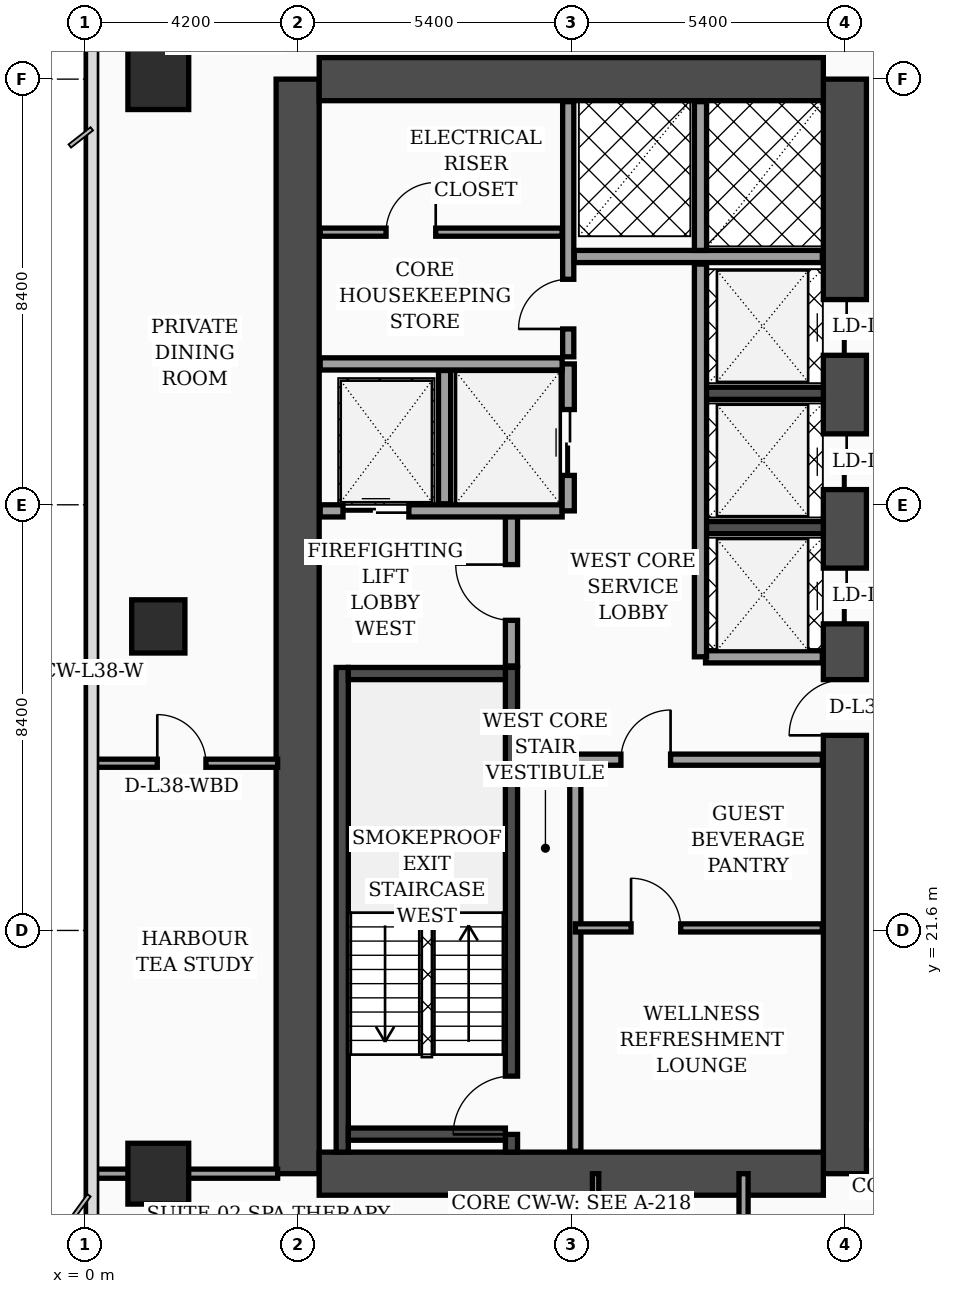
"""IFC4 building model, lengths in metres.
Left out: names, types, materials, properties, quantities, classifications, styles, units other than length and angle.
Written with IfcOpenShell. Run it as: python <this file> out.ifc"""

import sys

from ifc_helpers import new_model, si_unit, direction, frame, frame_2d, origin, origin_2d, place, context, subcontext, project, spatial, rectangle, extrude, element, fill, save


model = new_model("IFC4")
c1 = context("Model", 3, precision=1e-05, world=origin(), true_north=direction((0.0, 1.0)))
c2 = subcontext(c1, "Body", "Model", "MODEL_VIEW")
j1 = project(units=[si_unit("LENGTHUNIT", "METRE"), si_unit("PLANEANGLEUNIT", "RADIAN")], contexts=[c1])
p1 = place(None, origin())
s1 = spatial("IfcSite", under=j1, at=p1, CompositionType="ELEMENT")
p2 = place(p1, origin())
s2 = spatial("IfcBuilding", under=s1, at=p2, CompositionType="ELEMENT")
p3 = place(p2, frame((0.0, 0.0, 156.1)))
s3 = spatial("IfcBuildingStorey", under=s2, at=p3, CompositionType="ELEMENT", Elevation=156.1)
p4 = place(p3, frame((4.2, 16.8, 0.0), z_axis=(0.0, 0.0, 1.0), x_axis=(0.0, 1.0, 0.0)))
e1 = element("IfcWall", 1, at=p4, inside=s3, PredefinedType="SHEAR", context=c2, shape_type="SweptSolid", body=[
    extrude(rectangle(XDim=21.6, YDim=0.85, at=frame_2d((10.8, 0.0))), origin(), (0.0, 0.0, 1.0), 3.56),
])
p5 = place(p3, frame((15.0, 16.8, 0.0), z_axis=(0.0, 0.0, 1.0), x_axis=(0.0, 1.0, 0.0)))
e2 = element("IfcWall", 2, at=p5, inside=s3, PredefinedType="SHEAR", context=c2, shape_type="SweptSolid", body=[
    extrude(rectangle(XDim=21.6, YDim=0.85, at=frame_2d((10.8, 0.0))), origin(), (0.0, 0.0, 1.0), 3.56),
])
p6 = place(p5, frame((8.65, 0.0, 0.0)))
e3 = element("IfcOpeningElement", 3, at=p6, cuts=e2, PredefinedType="OPENING", context=c2, shape_type="SweptSolid", body=[
    extrude(rectangle(XDim=1.1, YDim=2.2, at=frame_2d((0.55, 1.1))), frame((0.0, 0.435, 0.0), z_axis=(0.0, -1.0, 0.0), x_axis=(1.0, 0.0, 0.0)), (0.0, 0.0, 1.0), 0.87),
])
p7 = place(p5, frame((10.85, 0.0, 0.0)))
e4 = element("IfcOpeningElement", 4, at=p7, cuts=e2, PredefinedType="OPENING", context=c2, shape_type="SweptSolid", body=[
    extrude(rectangle(XDim=1.1, YDim=2.2, at=frame_2d((0.55, 1.1))), frame((0.0, 0.435, 0.0), z_axis=(0.0, -1.0, 0.0), x_axis=(1.0, 0.0, 0.0)), (0.0, 0.0, 1.0), 0.87),
])
p8 = place(p5, frame((13.5, 0.0, 0.0)))
e5 = element("IfcOpeningElement", 5, at=p8, cuts=e2, PredefinedType="OPENING", context=c2, shape_type="SweptSolid", body=[
    extrude(rectangle(XDim=1.1, YDim=2.2, at=frame_2d((0.55, 1.1))), frame((0.0, 0.435, 0.0), z_axis=(0.0, -1.0, 0.0), x_axis=(1.0, 0.0, 0.0)), (0.0, 0.0, 1.0), 0.87),
])
p9 = place(p5, frame((16.15, 0.0, 0.0)))
e6 = element("IfcOpeningElement", 6, at=p9, cuts=e2, PredefinedType="OPENING", context=c2, shape_type="SweptSolid", body=[
    extrude(rectangle(XDim=1.1, YDim=2.2, at=frame_2d((0.55, 1.1))), frame((0.0, 0.435, 0.0), z_axis=(0.0, -1.0, 0.0), x_axis=(1.0, 0.0, 0.0)), (0.0, 0.0, 1.0), 0.87),
])
for number, where, z_axis, x_axis in (
    (7, (4.625, 38.4, 0.0), (0.0, 0.0, 1.0), (1.0, 0.0, 0.0)),
    (8, (4.625, 16.8, 0.0), (0.0, 0.0, 1.0), (1.0, 0.0, 0.0)),
):
    element("IfcWall", number, at=place(p3, frame(where, z_axis=z_axis, x_axis=x_axis)), inside=s3, PredefinedType="SHEAR", context=c2, shape_type="SweptSolid", body=[
        extrude(rectangle(XDim=9.95, YDim=0.85, at=frame_2d((4.975, 0.0))), origin(), (0.0, 0.0, 1.0), 3.56),
    ])
p10 = place(p3, frame((5.08, 17.225, 0.0), z_axis=(0.0, 0.0, 1.0), x_axis=(0.0, 1.0, 0.0)))
e9 = element("IfcWall", 9, at=p10, inside=s3, PredefinedType="SOLIDWALL", context=c2, shape_type="SweptSolid", body=[
    extrude(rectangle(XDim=9.565, YDim=0.24, at=frame_2d((4.782, 0.0))), origin(), (0.0, 0.0, 1.0), 3.56),
])
p11 = place(p3, frame((8.42, 17.225, 0.0), z_axis=(0.0, 0.0, 1.0), x_axis=(0.0, 1.0, 0.0)))
e10 = element("IfcWall", 10, at=p11, inside=s3, PredefinedType="SOLIDWALL", context=c2, shape_type="SweptSolid", body=[
    extrude(rectangle(XDim=9.565, YDim=0.24, at=frame_2d((4.782, 0.0))), origin(), (0.0, 0.0, 1.0), 3.56),
])
p12 = place(p11, frame((0.35, 0.0, 0.0)))
e11 = element("IfcOpeningElement", 11, at=p12, cuts=e10, PredefinedType="OPENING", context=c2, shape_type="SweptSolid", body=[
    extrude(rectangle(XDim=1.15, YDim=2.2, at=frame_2d((0.575, 1.1))), frame((0.0, 0.13, 0.0), z_axis=(0.0, -1.0, 0.0), x_axis=(1.0, 0.0, 0.0)), (0.0, 0.0, 1.0), 0.26),
])
for number, where, z_axis, x_axis in (
    (12, (5.2, 17.58, 0.0), (0.0, 0.0, 1.0), (1.0, 0.0, 0.0)),
    (13, (5.2, 26.67, 0.0), (0.0, 0.0, 1.0), (1.0, 0.0, 0.0)),
):
    element("IfcWall", number, at=place(p3, frame(where, z_axis=z_axis, x_axis=x_axis)), inside=s3, PredefinedType="SOLIDWALL", context=c2, shape_type="SweptSolid", body=[
        extrude(rectangle(XDim=3.1, YDim=0.24, at=frame_2d((1.55, 0.0))), origin(), (0.0, 0.0, 1.0), 3.56),
    ])
for number, where, z_axis, x_axis in (
    (14, (12.18, 29.55, 0.0), (0.0, 0.0, 1.0), (1.0, 0.0, 0.0)),
    (15, (12.18, 32.2, 0.0), (0.0, 0.0, 1.0), (1.0, 0.0, 0.0)),
):
    element("IfcWall", number, at=place(p3, frame(where, z_axis=z_axis, x_axis=x_axis)), inside=s3, PredefinedType="SOLIDWALL", context=c2, shape_type="SweptSolid", body=[
        extrude(rectangle(XDim=2.395, YDim=0.24, at=frame_2d((1.198, 0.0))), origin(), (0.0, 0.0, 1.0), 3.56),
    ])
p13 = place(p3, frame((1.45, 16.8, 0.0), z_axis=(0.0, 0.0, 1.0), x_axis=(1.0, 0.0, 0.0)))
e16 = element("IfcColumn", 16, at=p13, inside=s3, PredefinedType="COLUMN", context=c2, shape_type="SweptSolid", body=[
    extrude(rectangle(XDim=1.2, YDim=1.2, at=origin_2d()), origin(), (0.0, 0.0, 1.0), 3.56),
])
p14 = place(p3, frame((1.45, 27.6, 0.0), z_axis=(0.0, 0.0, 1.0), x_axis=(1.0, 0.0, 0.0)))
e17 = element("IfcColumn", 17, at=p14, inside=s3, PredefinedType="COLUMN", context=c2, shape_type="SweptSolid", body=[
    extrude(rectangle(XDim=1.05, YDim=1.05, at=origin_2d()), origin(), (0.0, 0.0, 1.0), 3.56),
])
p15 = place(p3, frame((1.45, 38.4, 0.0), z_axis=(0.0, 0.0, 1.0), x_axis=(1.0, 0.0, 0.0)))
e18 = element("IfcColumn", 18, at=p15, inside=s3, PredefinedType="COLUMN", context=c2, shape_type="SweptSolid", body=[
    extrude(rectangle(XDim=1.2, YDim=1.2, at=origin_2d()), origin(), (0.0, 0.0, 1.0), 3.56),
])
p16 = place(p3, frame((8.42, 26.82, 0.0), z_axis=(0.0, 0.0, 1.0), x_axis=(0.0, 1.0, 0.0)))
e19 = element("IfcWall", 19, at=p16, inside=s3, PredefinedType="SOLIDWALL", context=c2, shape_type="SweptSolid", body=[
    extrude(rectangle(XDim=3.0, YDim=0.24, at=frame_2d((1.5, 0.0))), origin(), (0.0, 0.0, 1.0), 3.56),
])
p17 = place(p16, frame((0.9, 0.0, 0.0)))
e20 = element("IfcOpeningElement", 20, at=p17, cuts=e19, PredefinedType="OPENING", context=c2, shape_type="SweptSolid", body=[
    extrude(rectangle(XDim=1.1, YDim=2.2, at=frame_2d((0.55, 1.1))), frame((0.0, 0.13, 0.0), z_axis=(0.0, -1.0, 0.0), x_axis=(1.0, 0.0, 0.0)), (0.0, 0.0, 1.0), 0.26),
])
p18 = place(p3, frame((4.645, 29.88, 0.0), z_axis=(0.0, 0.0, 1.0), x_axis=(1.0, 0.0, 0.0)))
e21 = element("IfcWall", 21, at=p18, inside=s3, PredefinedType="SOLIDWALL", context=c2, shape_type="SweptSolid", body=[
    extrude(rectangle(XDim=4.775, YDim=0.24, at=frame_2d((2.387, 0.0))), origin(), (0.0, 0.0, 1.0), 3.56),
])
p19 = place(p18, frame((0.45, 0.0, 0.0)))
e22 = element("IfcOpeningElement", 22, at=p19, cuts=e21, PredefinedType="OPENING", context=c2, shape_type="SweptSolid", body=[
    extrude(rectangle(XDim=1.3, YDim=2.35, at=frame_2d((0.65, 1.175))), frame((0.0, 0.13, 0.0), z_axis=(0.0, -1.0, 0.0), x_axis=(1.0, 0.0, 0.0)), (0.0, 0.0, 1.0), 0.26),
])
p20 = place(p3, frame((7.1, 30.02, 0.0), z_axis=(0.0, 0.0, 1.0), x_axis=(0.0, 1.0, 0.0)))
e23 = element("IfcWall", 23, at=p20, inside=s3, PredefinedType="SOLIDWALL", context=c2, shape_type="SweptSolid", body=[
    extrude(rectangle(XDim=2.63, YDim=0.24, at=frame_2d((1.315, 0.0))), origin(), (0.0, 0.0, 1.0), 3.56),
])
p21 = place(p3, frame((9.54, 29.88, 0.0), z_axis=(0.0, 0.0, 1.0), x_axis=(0.0, 1.0, 0.0)))
e24 = element("IfcWall", 24, at=p21, inside=s3, PredefinedType="SOLIDWALL", context=c2, shape_type="SweptSolid", body=[
    extrude(rectangle(XDim=2.9, YDim=0.24, at=frame_2d((1.45, 0.0))), origin(), (0.0, 0.0, 1.0), 3.56),
])
p22 = place(p21, frame((0.7, 0.0, 0.0)))
e25 = element("IfcOpeningElement", 25, at=p22, cuts=e24, PredefinedType="OPENING", context=c2, shape_type="SweptSolid", body=[
    extrude(rectangle(XDim=1.3, YDim=2.35, at=frame_2d((0.65, 1.175))), frame((0.0, 0.13, 0.0), z_axis=(0.0, -1.0, 0.0), x_axis=(1.0, 0.0, 0.0)), (0.0, 0.0, 1.0), 0.26),
])
p23 = place(p3, frame((4.645, 32.78, 0.0), z_axis=(0.0, 0.0, 1.0), x_axis=(1.0, 0.0, 0.0)))
e26 = element("IfcWall", 26, at=p23, inside=s3, PredefinedType="SOLIDWALL", context=c2, shape_type="SweptSolid", body=[
    extrude(rectangle(XDim=4.775, YDim=0.24, at=frame_2d((2.387, 0.0))), origin(), (0.0, 0.0, 1.0), 3.19),
])
p24 = place(p3, frame((9.68, 17.245, 0.0), z_axis=(0.0, 0.0, 1.0), x_axis=(0.0, 1.0, 0.0)))
e27 = element("IfcWall", 27, at=p24, inside=s3, PredefinedType="SOLIDWALL", context=c2, shape_type="SweptSolid", body=[
    extrude(rectangle(XDim=7.755, YDim=0.22, at=frame_2d((3.877, 0.0))), origin(), (0.0, 0.0, 1.0), 3.56),
])
p25 = place(p3, frame((4.645, 35.38, 0.0), z_axis=(0.0, 0.0, 1.0), x_axis=(1.0, 0.0, 0.0)))
e28 = element("IfcWall", 28, at=p25, inside=s3, PredefinedType="PARTITIONING", context=c2, shape_type="SweptSolid", body=[
    extrude(rectangle(XDim=4.775, YDim=0.16, at=frame_2d((2.387, 0.0))), origin(), (0.0, 0.0, 1.0), 3.56),
])
p26 = place(p25, frame((1.3, 0.0, 0.0)))
e29 = element("IfcOpeningElement", 29, at=p26, cuts=e28, PredefinedType="OPENING", context=c2, shape_type="SweptSolid", body=[
    extrude(rectangle(XDim=0.98, YDim=2.15, at=frame_2d((0.49, 1.075))), frame((0.0, 0.09, 0.0), z_axis=(0.0, -1.0, 0.0), x_axis=(1.0, 0.0, 0.0)), (0.0, 0.0, 1.0), 0.18),
])
p27 = place(p3, frame((9.54, 32.92, 0.0), z_axis=(0.0, 0.0, 1.0), x_axis=(0.0, 1.0, 0.0)))
e30 = element("IfcWall", 30, at=p27, inside=s3, PredefinedType="SOLIDWALL", context=c2, shape_type="SweptSolid", body=[
    extrude(rectangle(XDim=5.035, YDim=0.22, at=frame_2d((2.518, 0.0))), origin(), (0.0, 0.0, 1.0), 3.56),
])
p28 = place(p27, frame((0.55, 0.0, 0.0)))
e31 = element("IfcOpeningElement", 31, at=p28, cuts=e30, PredefinedType="OPENING", context=c2, shape_type="SweptSolid", body=[
    extrude(rectangle(XDim=0.98, YDim=2.15, at=frame_2d((0.49, 1.075))), frame((0.0, 0.12, 0.0), z_axis=(0.0, -1.0, 0.0), x_axis=(1.0, 0.0, 0.0)), (0.0, 0.0, 1.0), 0.24),
])
p29 = place(p3, frame((9.68, 21.65, 0.0), z_axis=(0.0, 0.0, 1.0), x_axis=(1.0, 0.0, 0.0)))
e32 = element("IfcWall", 32, at=p29, inside=s3, PredefinedType="PARTITIONING", context=c2, shape_type="SweptSolid", body=[
    extrude(rectangle(XDim=4.875, YDim=0.16, at=frame_2d((2.438, 0.0))), origin(), (0.0, 0.0, 1.0), 3.09),
])
p30 = place(p29, frame((1.1, 0.0, 0.0)))
e33 = element("IfcOpeningElement", 33, at=p30, cuts=e32, PredefinedType="OPENING", context=c2, shape_type="SweptSolid", body=[
    extrude(rectangle(XDim=0.98, YDim=2.15, at=frame_2d((0.49, 1.075))), frame((0.0, 0.09, 0.0), z_axis=(0.0, -1.0, 0.0), x_axis=(1.0, 0.0, 0.0)), (0.0, 0.0, 1.0), 0.18),
])
p31 = place(p3, frame((9.68, 24.97, 0.0), z_axis=(0.0, 0.0, 1.0), x_axis=(1.0, 0.0, 0.0)))
e34 = element("IfcWall", 34, at=p31, inside=s3, PredefinedType="SOLIDWALL", context=c2, shape_type="SweptSolid", body=[
    extrude(rectangle(XDim=4.875, YDim=0.22, at=frame_2d((2.438, 0.0))), origin(), (0.0, 0.0, 1.0), 2.94),
])
p32 = place(p31, frame((0.9, 0.0, 0.0)))
e35 = element("IfcOpeningElement", 35, at=p32, cuts=e34, PredefinedType="OPENING", context=c2, shape_type="SweptSolid", body=[
    extrude(rectangle(XDim=0.98, YDim=2.15, at=frame_2d((0.49, 1.075))), frame((0.0, 0.12, 0.0), z_axis=(0.0, -1.0, 0.0), x_axis=(1.0, 0.0, 0.0)), (0.0, 0.0, 1.0), 0.24),
])
p33 = place(p3, frame((12.25, 27.0, 0.0), z_axis=(0.0, 0.0, 1.0), x_axis=(1.0, 0.0, 0.0)))
e36 = element("IfcWall", 36, at=p33, inside=s3, PredefinedType="SOLIDWALL", context=c2, shape_type="SweptSolid", body=[
    extrude(rectangle(XDim=2.305, YDim=0.24, at=frame_2d((1.152, 0.0))), origin(), (0.0, 0.0, 1.0), 3.56),
])
p34 = place(p3, frame((12.15, 27.0, 0.0), z_axis=(0.0, 0.0, 1.0), x_axis=(0.0, 1.0, 0.0)))
e37 = element("IfcWall", 37, at=p34, inside=s3, PredefinedType="SOLIDWALL", context=c2, shape_type="SweptSolid", body=[
    extrude(rectangle(XDim=7.75, YDim=0.24, at=frame_2d((3.875, 0.0))), origin(), (0.0, 0.0, 1.0), 3.56),
])
p35 = place(p3, frame((9.66, 34.9, 0.0), z_axis=(0.0, 0.0, 1.0), x_axis=(1.0, 0.0, 0.0)))
e38 = element("IfcWall", 38, at=p35, inside=s3, PredefinedType="SOLIDWALL", context=c2, shape_type="SweptSolid", body=[
    extrude(rectangle(XDim=4.895, YDim=0.24, at=frame_2d((2.448, 0.0))), origin(), (0.0, 0.0, 1.0), 3.56),
])
p36 = place(p3, frame((12.15, 35.02, 0.0), z_axis=(0.0, 0.0, 1.0), x_axis=(0.0, 1.0, 0.0)))
e39 = element("IfcWall", 39, at=p36, inside=s3, PredefinedType="SOLIDWALL", context=c2, shape_type="SweptSolid", body=[
    extrude(rectangle(XDim=2.935, YDim=0.24, at=frame_2d((1.468, 0.0))), origin(), (0.0, 0.0, 1.0), 3.56),
])
p37 = place(p3, frame((0.08, 24.9, 0.0), z_axis=(0.0, 0.0, 1.0), x_axis=(1.0, 0.0, 0.0)))
e40 = element("IfcWall", 40, at=p37, inside=s3, PredefinedType="PARTITIONING", context=c2, shape_type="SweptSolid", body=[
    extrude(rectangle(XDim=3.725, YDim=0.16, at=frame_2d((1.862, 0.0))), origin(), (0.0, 0.0, 1.0), 3.04),
])
p38 = place(p37, frame((1.35, 0.0, 0.0)))
e41 = element("IfcOpeningElement", 41, at=p38, cuts=e40, PredefinedType="OPENING", context=c2, shape_type="SweptSolid", body=[
    extrude(rectangle(XDim=0.96, YDim=2.2, at=frame_2d((0.48, 1.1))), frame((0.0, 0.09, 0.0), z_axis=(0.0, -1.0, 0.0), x_axis=(1.0, 0.0, 0.0)), (0.0, 0.0, 1.0), 0.18),
])
p39 = place(p3, frame((0.08, 16.8, 0.0), z_axis=(0.0, 0.0, 1.0), x_axis=(1.0, 0.0, 0.0)))
e42 = element("IfcWall", 42, at=p39, inside=s3, PredefinedType="PARTITIONING", context=c2, shape_type="SweptSolid", body=[
    extrude(rectangle(XDim=3.725, YDim=0.18, at=frame_2d((1.862, 0.0))), origin(), (0.0, 0.0, 1.0), 2.94),
])
p40 = place(p3, frame((10.08, 14.67, 0.0), z_axis=(0.0, 0.0, 1.0), x_axis=(0.0, 1.0, 0.0)))
e43 = element("IfcWall", 43, at=p40, inside=s3, PredefinedType="PARTITIONING", context=c2, shape_type="SweptSolid", body=[
    extrude(rectangle(XDim=2.13, YDim=0.125, at=frame_2d((1.065, 0.0))), origin(), (0.0, 0.0, 1.0), 3.56),
])
p41 = place(p3, frame((13.0, 2.44, 0.0), z_axis=(0.0, 0.0, 1.0), x_axis=(0.0, 1.0, 0.0)))
e44 = element("IfcWall", 44, at=p41, inside=s3, PredefinedType="PARTITIONING", context=c2, shape_type="SweptSolid", body=[
    extrude(rectangle(XDim=14.36, YDim=0.18, at=frame_2d((7.18, 0.0))), origin(), (0.0, 0.0, 1.0), 2.94),
])
p42 = place(p41, frame((3.01, 0.0, 0.0)))
e45 = element("IfcOpeningElement", 45, at=p42, cuts=e44, PredefinedType="OPENING", context=c2, shape_type="SweptSolid", body=[
    extrude(rectangle(XDim=1.02, YDim=2.2, at=frame_2d((0.51, 1.1))), frame((0.0, 0.1, 0.0), z_axis=(0.0, -1.0, 0.0), x_axis=(1.0, 0.0, 0.0)), (0.0, 0.0, 1.0), 0.2),
])
p43 = place(p41, frame((8.94, 0.0, 0.0)))
e46 = element("IfcOpeningElement", 46, at=p43, cuts=e44, PredefinedType="OPENING", context=c2, shape_type="SweptSolid", body=[
    extrude(rectangle(XDim=1.02, YDim=2.2, at=frame_2d((0.51, 1.1))), frame((0.0, 0.1, 0.0), z_axis=(0.0, -1.0, 0.0), x_axis=(1.0, 0.0, 0.0)), (0.0, 0.0, 1.0), 0.2),
])
p44 = place(p17, origin())
e47 = element("IfcDoor", 47, at=p44, inside=s3, OperationType="SINGLE_SWING_RIGHT", PredefinedType="DOOR", context=c2, shape_type="SweptSolid", body=[
    extrude(rectangle(XDim=1.1, YDim=2.2, at=frame_2d((0.55, 1.1))), frame((0.0, 0.025, 0.0), z_axis=(0.0, -1.0, 0.0), x_axis=(1.0, 0.0, 0.0)), (0.0, 0.0, 1.0), 0.05),
])
fill(e20, e47)
p45 = place(p19, origin())
e48 = element("IfcDoor", 48, at=p45, inside=s3, OperationType="DOUBLE_DOOR_SLIDING", PredefinedType="DOOR", context=c2, shape_type="SweptSolid", body=[
    extrude(rectangle(XDim=1.3, YDim=2.35, at=frame_2d((0.65, 1.175))), frame((0.0, 0.025, 0.0), z_axis=(0.0, -1.0, 0.0), x_axis=(1.0, 0.0, 0.0)), (0.0, 0.0, 1.0), 0.05),
])
fill(e22, e48)
p46 = place(p22, origin())
e49 = element("IfcDoor", 49, at=p46, inside=s3, OperationType="DOUBLE_DOOR_SLIDING", PredefinedType="DOOR", context=c2, shape_type="SweptSolid", body=[
    extrude(rectangle(XDim=1.3, YDim=2.35, at=frame_2d((0.65, 1.175))), frame((0.0, 0.025, 0.0), z_axis=(0.0, -1.0, 0.0), x_axis=(1.0, 0.0, 0.0)), (0.0, 0.0, 1.0), 0.05),
])
fill(e25, e49)
p47 = place(p26, origin())
e50 = element("IfcDoor", 50, at=p47, inside=s3, OperationType="SINGLE_SWING_RIGHT", PredefinedType="DOOR", context=c2, shape_type="SweptSolid", body=[
    extrude(rectangle(XDim=0.98, YDim=2.15, at=frame_2d((0.49, 1.075))), frame((0.0, 0.025, 0.0), z_axis=(0.0, -1.0, 0.0), x_axis=(1.0, 0.0, 0.0)), (0.0, 0.0, 1.0), 0.05),
])
fill(e29, e50)
p48 = place(p28, origin())
e51 = element("IfcDoor", 51, at=p48, inside=s3, OperationType="SINGLE_SWING_LEFT", PredefinedType="DOOR", context=c2, shape_type="SweptSolid", body=[
    extrude(rectangle(XDim=0.98, YDim=2.15, at=frame_2d((0.49, 1.075))), frame((0.0, 0.025, 0.0), z_axis=(0.0, -1.0, 0.0), x_axis=(1.0, 0.0, 0.0)), (0.0, 0.0, 1.0), 0.05),
])
fill(e31, e51)
p49 = place(p30, origin())
e52 = element("IfcDoor", 52, at=p49, inside=s3, OperationType="SINGLE_SWING_LEFT", PredefinedType="DOOR", context=c2, shape_type="SweptSolid", body=[
    extrude(rectangle(XDim=0.98, YDim=2.15, at=frame_2d((0.49, 1.075))), frame((0.0, 0.025, 0.0), z_axis=(0.0, -1.0, 0.0), x_axis=(1.0, 0.0, 0.0)), (0.0, 0.0, 1.0), 0.05),
])
fill(e33, e52)
p50 = place(p32, origin())
e53 = element("IfcDoor", 53, at=p50, inside=s3, OperationType="SINGLE_SWING_RIGHT", PredefinedType="DOOR", context=c2, shape_type="SweptSolid", body=[
    extrude(rectangle(XDim=0.98, YDim=2.15, at=frame_2d((0.49, 1.075))), frame((0.0, 0.025, 0.0), z_axis=(0.0, -1.0, 0.0), x_axis=(1.0, 0.0, 0.0)), (0.0, 0.0, 1.0), 0.05),
])
fill(e35, e53)
p51 = place(p38, origin())
e54 = element("IfcDoor", 54, at=p51, inside=s3, OperationType="SINGLE_SWING_LEFT", PredefinedType="DOOR", context=c2, shape_type="SweptSolid", body=[
    extrude(rectangle(XDim=0.96, YDim=2.2, at=frame_2d((0.48, 1.1))), frame((0.0, 0.025, 0.0), z_axis=(0.0, -1.0, 0.0), x_axis=(1.0, 0.0, 0.0)), (0.0, 0.0, 1.0), 0.05),
])
fill(e41, e54)
p52 = place(p12, origin())
e55 = element("IfcDoor", 55, at=p52, inside=s3, OperationType="SINGLE_SWING_LEFT", PredefinedType="DOOR", context=c2, shape_type="SweptSolid", body=[
    extrude(rectangle(XDim=1.15, YDim=2.2, at=frame_2d((0.575, 1.1))), frame((0.0, 0.025, 0.0), z_axis=(0.0, -1.0, 0.0), x_axis=(1.0, 0.0, 0.0)), (0.0, 0.0, 1.0), 0.05),
])
fill(e11, e55)
p53 = place(p6, origin())
e56 = element("IfcDoor", 56, at=p53, inside=s3, OperationType="SINGLE_SWING_LEFT", PredefinedType="DOOR", context=c2, shape_type="SweptSolid", body=[
    extrude(rectangle(XDim=1.1, YDim=2.2, at=frame_2d((0.55, 1.1))), frame((0.0, 0.025, 0.0), z_axis=(0.0, -1.0, 0.0), x_axis=(1.0, 0.0, 0.0)), (0.0, 0.0, 1.0), 0.05),
])
fill(e3, e56)
p54 = place(p7, origin())
e57 = element("IfcDoor", 57, at=p54, inside=s3, OperationType="DOUBLE_DOOR_SLIDING", PredefinedType="DOOR", context=c2, shape_type="SweptSolid", body=[
    extrude(rectangle(XDim=1.1, YDim=2.2, at=frame_2d((0.55, 1.1))), frame((0.0, 0.025, 0.0), z_axis=(0.0, -1.0, 0.0), x_axis=(1.0, 0.0, 0.0)), (0.0, 0.0, 1.0), 0.05),
])
fill(e4, e57)
p55 = place(p8, origin())
e58 = element("IfcDoor", 58, at=p55, inside=s3, OperationType="DOUBLE_DOOR_SLIDING", PredefinedType="DOOR", context=c2, shape_type="SweptSolid", body=[
    extrude(rectangle(XDim=1.1, YDim=2.2, at=frame_2d((0.55, 1.1))), frame((0.0, 0.025, 0.0), z_axis=(0.0, -1.0, 0.0), x_axis=(1.0, 0.0, 0.0)), (0.0, 0.0, 1.0), 0.05),
])
fill(e5, e58)
p56 = place(p9, origin())
e59 = element("IfcDoor", 59, at=p56, inside=s3, OperationType="DOUBLE_DOOR_SLIDING", PredefinedType="DOOR", context=c2, shape_type="SweptSolid", body=[
    extrude(rectangle(XDim=1.1, YDim=2.2, at=frame_2d((0.55, 1.1))), frame((0.0, 0.025, 0.0), z_axis=(0.0, -1.0, 0.0), x_axis=(1.0, 0.0, 0.0)), (0.0, 0.0, 1.0), 0.05),
])
fill(e6, e59)
save(model, sys.argv[1])
